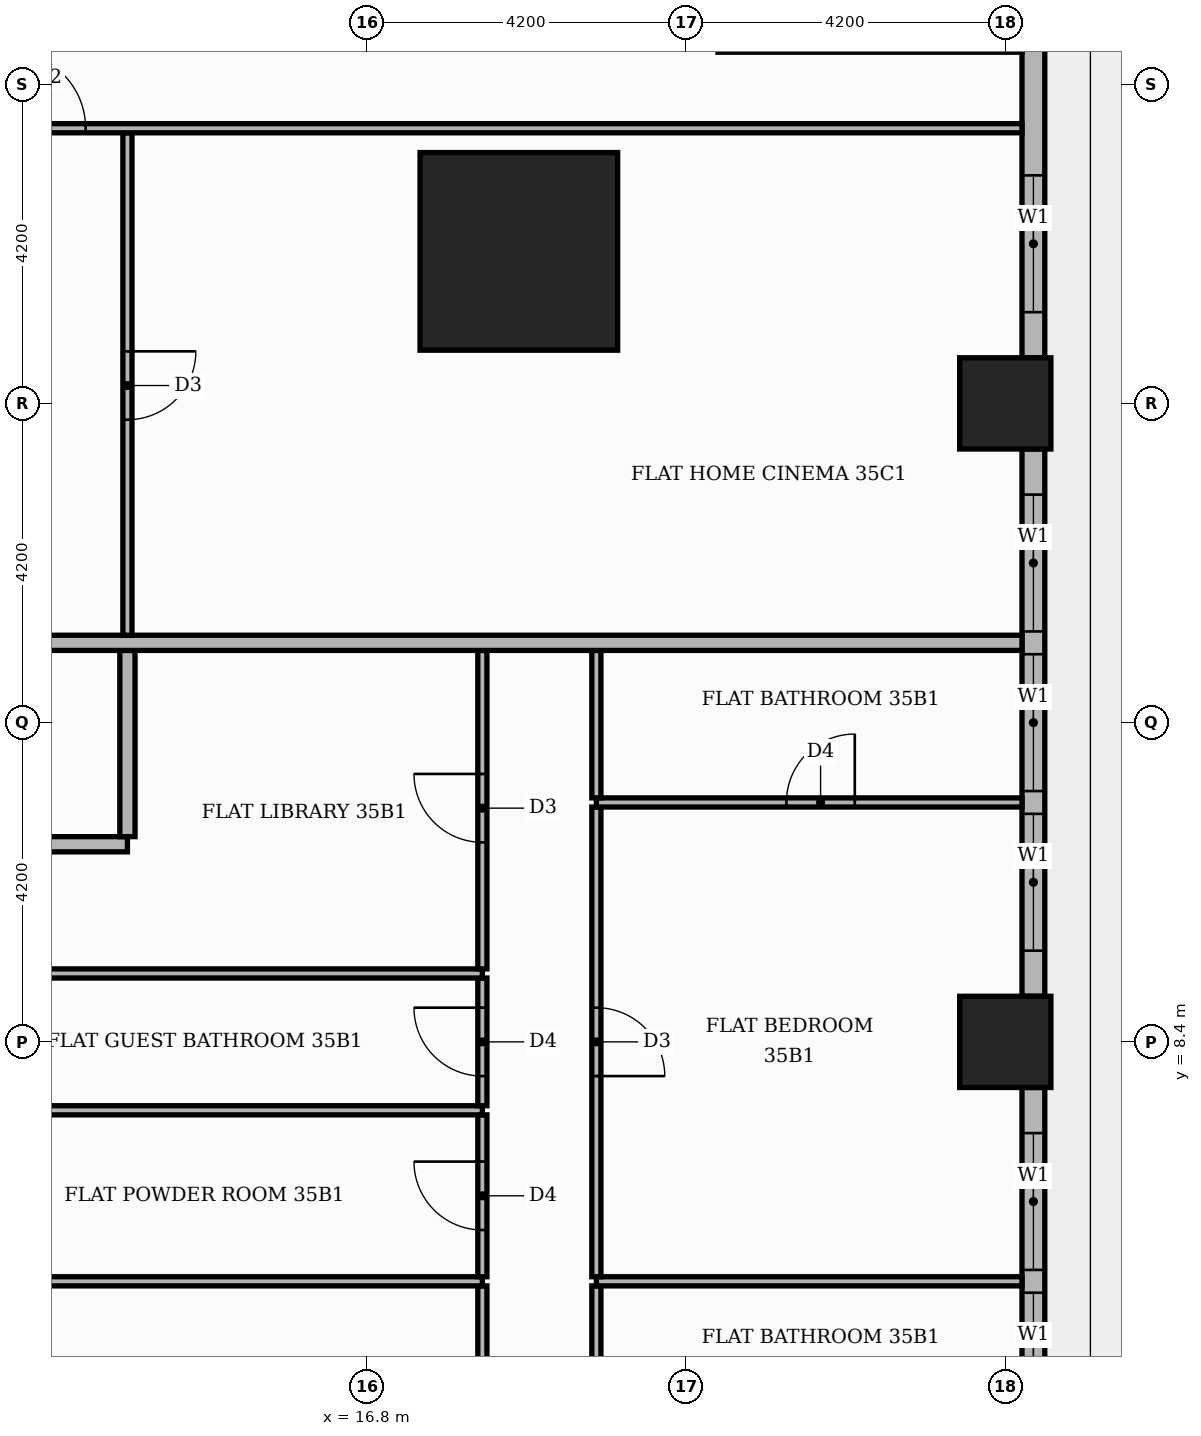
"""IFC4 building model, lengths in metres.
Left out: names, types, materials, properties, quantities, classifications, styles, units other than length and angle.
Written with IfcOpenShell. Run it as: python <this file> out.ifc"""

import sys

from ifc_helpers import new_model, si_unit, direction, frame, frame_2d, origin, origin_2d, place, context, subcontext, project, spatial, rectangle, extrude, element, fill, save


model = new_model("IFC4")
c1 = context("Model", 3, precision=1e-05, world=origin(), true_north=direction((0.0, 1.0)))
c2 = subcontext(c1, "Body", "Model", "MODEL_VIEW")
j1 = project(units=[si_unit("LENGTHUNIT", "METRE"), si_unit("PLANEANGLEUNIT", "RADIAN")], contexts=[c1])
p1 = place(None, origin())
s1 = spatial("IfcSite", under=j1, at=p1, CompositionType="ELEMENT")
p2 = place(p1, origin())
s2 = spatial("IfcBuilding", under=s1, at=p2, CompositionType="ELEMENT")
p3 = place(p2, frame((0.0, 0.0, 149.4)))
s3 = spatial("IfcBuildingStorey", under=s2, at=p3, CompositionType="ELEMENT", Elevation=149.4)
p4 = place(p3, frame((18.8, 18.8, 0.0), z_axis=(0.0, 0.0, 1.0), x_axis=(1.0, 0.0, 0.0)))
e1 = element("IfcColumn", 1, at=p4, inside=s3, PredefinedType="COLUMN", context=c2, shape_type="SweptSolid", body=[
    extrude(rectangle(XDim=2.6, YDim=2.6, at=origin_2d()), origin(), (0.0, 0.0, 1.0), 3.9),
])
for number, where, z_axis, x_axis in (
    (2, (25.2, 8.4, 0.0), (0.0, 0.0, 1.0), (1.0, 0.0, 0.0)),
    (3, (25.2, 16.8, 0.0), (0.0, 0.0, 1.0), (1.0, 0.0, 0.0)),
):
    element("IfcColumn", number, at=place(p3, frame(where, z_axis=z_axis, x_axis=x_axis)), inside=s3, PredefinedType="COLUMN", context=c2, shape_type="SweptSolid", body=[
        extrude(rectangle(XDim=1.2, YDim=1.2, at=origin_2d()), origin(), (0.0, 0.0, 1.0), 3.9),
    ])
p5 = place(p3, frame((25.57, 0.6, 0.0), z_axis=(0.0, 0.0, 1.0), x_axis=(0.0, 1.0, 0.0)))
e4 = element("IfcWall", 4, at=p5, inside=s3, PredefinedType="STANDARD", context=c2, shape_type="SweptSolid", body=[
    extrude(rectangle(XDim=7.2, YDim=0.3, at=frame_2d((3.6, 0.0))), origin(), (0.0, 0.0, 1.0), 3.48),
])
p6 = place(p5, frame((0.6, 0.0, 0.9)))
e5 = element("IfcOpeningElement", 5, at=p6, cuts=e4, PredefinedType="OPENING", context=c2, shape_type="SweptSolid", body=[
    extrude(rectangle(XDim=1.8, YDim=2.1, at=frame_2d((0.9, 1.05))), frame((0.0, 0.16, 0.0), z_axis=(0.0, -1.0, 0.0), x_axis=(1.0, 0.0, 0.0)), (0.0, 0.0, 1.0), 0.32),
])
p7 = place(p5, frame((2.7, 0.0, 0.9)))
e6 = element("IfcOpeningElement", 6, at=p7, cuts=e4, PredefinedType="OPENING", context=c2, shape_type="SweptSolid", body=[
    extrude(rectangle(XDim=1.8, YDim=2.1, at=frame_2d((0.9, 1.05))), frame((0.0, 0.16, 0.0), z_axis=(0.0, -1.0, 0.0), x_axis=(1.0, 0.0, 0.0)), (0.0, 0.0, 1.0), 0.32),
])
p8 = place(p5, frame((4.8, 0.0, 0.9)))
e7 = element("IfcOpeningElement", 7, at=p8, cuts=e4, PredefinedType="OPENING", context=c2, shape_type="SweptSolid", body=[
    extrude(rectangle(XDim=1.8, YDim=2.1, at=frame_2d((0.9, 1.05))), frame((0.0, 0.16, 0.0), z_axis=(0.0, -1.0, 0.0), x_axis=(1.0, 0.0, 0.0)), (0.0, 0.0, 1.0), 0.32),
])
p9 = place(p3, frame((25.57, 9.0, 0.0), z_axis=(0.0, 0.0, 1.0), x_axis=(0.0, 1.0, 0.0)))
e8 = element("IfcWall", 8, at=p9, inside=s3, PredefinedType="STANDARD", context=c2, shape_type="SweptSolid", body=[
    extrude(rectangle(XDim=7.2, YDim=0.3, at=frame_2d((3.6, 0.0))), origin(), (0.0, 0.0, 1.0), 3.48),
])
p10 = place(p9, frame((0.6, 0.0, 0.9)))
e9 = element("IfcOpeningElement", 9, at=p10, cuts=e8, PredefinedType="OPENING", context=c2, shape_type="SweptSolid", body=[
    extrude(rectangle(XDim=1.8, YDim=2.1, at=frame_2d((0.9, 1.05))), frame((0.0, 0.16, 0.0), z_axis=(0.0, -1.0, 0.0), x_axis=(1.0, 0.0, 0.0)), (0.0, 0.0, 1.0), 0.32),
])
p11 = place(p9, frame((2.7, 0.0, 0.9)))
e10 = element("IfcOpeningElement", 10, at=p11, cuts=e8, PredefinedType="OPENING", context=c2, shape_type="SweptSolid", body=[
    extrude(rectangle(XDim=1.8, YDim=2.1, at=frame_2d((0.9, 1.05))), frame((0.0, 0.16, 0.0), z_axis=(0.0, -1.0, 0.0), x_axis=(1.0, 0.0, 0.0)), (0.0, 0.0, 1.0), 0.32),
])
p12 = place(p9, frame((4.8, 0.0, 0.9)))
e11 = element("IfcOpeningElement", 11, at=p12, cuts=e8, PredefinedType="OPENING", context=c2, shape_type="SweptSolid", body=[
    extrude(rectangle(XDim=1.8, YDim=2.1, at=frame_2d((0.9, 1.05))), frame((0.0, 0.16, 0.0), z_axis=(0.0, -1.0, 0.0), x_axis=(1.0, 0.0, 0.0)), (0.0, 0.0, 1.0), 0.32),
])
p13 = place(p3, frame((25.57, 17.4, 0.0), z_axis=(0.0, 0.0, 1.0), x_axis=(0.0, 1.0, 0.0)))
e12 = element("IfcWall", 12, at=p13, inside=s3, PredefinedType="STANDARD", context=c2, shape_type="SweptSolid", body=[
    extrude(rectangle(XDim=4.32, YDim=0.3, at=frame_2d((2.16, 0.0))), origin(), (0.0, 0.0, 1.0), 3.48),
])
p14 = place(p13, frame((0.6, 0.0, 0.9)))
e13 = element("IfcOpeningElement", 13, at=p14, cuts=e12, PredefinedType="OPENING", context=c2, shape_type="SweptSolid", body=[
    extrude(rectangle(XDim=1.8, YDim=2.1, at=frame_2d((0.9, 1.05))), frame((0.0, 0.16, 0.0), z_axis=(0.0, -1.0, 0.0), x_axis=(1.0, 0.0, 0.0)), (0.0, 0.0, 1.0), 0.32),
])
p15 = place(p3, frame((18.32, 1.11, 0.0), z_axis=(0.0, 0.0, 1.0), x_axis=(0.0, 1.0, 0.0)))
e14 = element("IfcWall", 14, at=p15, inside=s3, PredefinedType="PARTITIONING", context=c2, shape_type="SweptSolid", body=[
    extrude(rectangle(XDim=4.08, YDim=0.12, at=frame_2d((2.04, 0.0))), origin(), (0.0, 0.0, 1.0), 3.48),
])
p16 = place(p15, frame((1.59, 0.0, 0.0)))
e15 = element("IfcOpeningElement", 15, at=p16, cuts=e14, PredefinedType="OPENING", context=c2, shape_type="SweptSolid", body=[
    extrude(rectangle(XDim=0.9, YDim=2.1, at=frame_2d((0.45, 1.05))), frame((0.0, 0.07, 0.0), z_axis=(0.0, -1.0, 0.0), x_axis=(1.0, 0.0, 0.0)), (0.0, 0.0, 1.0), 0.14),
])
p17 = place(p3, frame((19.82, 3.21, 0.0), z_axis=(0.0, 0.0, 1.0), x_axis=(0.0, 1.0, 0.0)))
e16 = element("IfcWall", 16, at=p17, inside=s3, PredefinedType="PARTITIONING", context=c2, shape_type="SweptSolid", body=[
    extrude(rectangle(XDim=1.98, YDim=0.12, at=frame_2d((0.99, 0.0))), origin(), (0.0, 0.0, 1.0), 3.48),
])
p18 = place(p3, frame((11.0, 5.25, 0.0), z_axis=(0.0, 0.0, 1.0), x_axis=(1.0, 0.0, 0.0)))
e17 = element("IfcWall", 17, at=p18, inside=s3, PredefinedType="PARTITIONING", context=c2, shape_type="SweptSolid", body=[
    extrude(rectangle(XDim=7.32, YDim=0.12, at=frame_2d((3.66, 0.0))), origin(), (0.0, 0.0, 1.0), 3.48),
])
p19 = place(p3, frame((19.82, 5.25, 0.0), z_axis=(0.0, 0.0, 1.0), x_axis=(1.0, 0.0, 0.0)))
e18 = element("IfcWall", 18, at=p19, inside=s3, PredefinedType="PARTITIONING", context=c2, shape_type="SweptSolid", body=[
    extrude(rectangle(XDim=5.6, YDim=0.12, at=frame_2d((2.8, 0.0))), origin(), (0.0, 0.0, 1.0), 3.48),
])
p20 = place(p3, frame((18.32, 5.31, 0.0), z_axis=(0.0, 0.0, 1.0), x_axis=(0.0, 1.0, 0.0)))
e19 = element("IfcWall", 19, at=p20, inside=s3, PredefinedType="PARTITIONING", context=c2, shape_type="SweptSolid", body=[
    extrude(rectangle(XDim=2.13, YDim=0.12, at=frame_2d((1.065, 0.0))), origin(), (0.0, 0.0, 1.0), 3.48),
])
p21 = place(p20, frame((0.615, 0.0, 0.0)))
e20 = element("IfcOpeningElement", 20, at=p21, cuts=e19, PredefinedType="OPENING", context=c2, shape_type="SweptSolid", body=[
    extrude(rectangle(XDim=0.9, YDim=2.1, at=frame_2d((0.45, 1.05))), frame((0.0, 0.07, 0.0), z_axis=(0.0, -1.0, 0.0), x_axis=(1.0, 0.0, 0.0)), (0.0, 0.0, 1.0), 0.14),
])
p22 = place(p3, frame((19.82, 5.31, 0.0), z_axis=(0.0, 0.0, 1.0), x_axis=(0.0, 1.0, 0.0)))
e21 = element("IfcWall", 21, at=p22, inside=s3, PredefinedType="PARTITIONING", context=c2, shape_type="SweptSolid", body=[
    extrude(rectangle(XDim=6.18, YDim=0.12, at=frame_2d((3.09, 0.0))), origin(), (0.0, 0.0, 1.0), 3.48),
])
p23 = place(p22, frame((2.64, 0.0, 0.0)))
e22 = element("IfcOpeningElement", 22, at=p23, cuts=e21, PredefinedType="OPENING", context=c2, shape_type="SweptSolid", body=[
    extrude(rectangle(XDim=0.9, YDim=2.1, at=frame_2d((0.45, 1.05))), frame((0.0, 0.07, 0.0), z_axis=(0.0, -1.0, 0.0), x_axis=(1.0, 0.0, 0.0)), (0.0, 0.0, 1.0), 0.14),
])
p24 = place(p3, frame((11.0, 7.5, 0.0), z_axis=(0.0, 0.0, 1.0), x_axis=(1.0, 0.0, 0.0)))
e23 = element("IfcWall", 23, at=p24, inside=s3, PredefinedType="PARTITIONING", context=c2, shape_type="SweptSolid", body=[
    extrude(rectangle(XDim=7.32, YDim=0.12, at=frame_2d((3.66, 0.0))), origin(), (0.0, 0.0, 1.0), 3.48),
])
p25 = place(p3, frame((18.32, 7.56, 0.0), z_axis=(0.0, 0.0, 1.0), x_axis=(0.0, 1.0, 0.0)))
e24 = element("IfcWall", 24, at=p25, inside=s3, PredefinedType="PARTITIONING", context=c2, shape_type="SweptSolid", body=[
    extrude(rectangle(XDim=1.68, YDim=0.12, at=frame_2d((0.84, 0.0))), origin(), (0.0, 0.0, 1.0), 3.48),
])
p26 = place(p25, frame((0.39, 0.0, 0.0)))
e25 = element("IfcOpeningElement", 25, at=p26, cuts=e24, PredefinedType="OPENING", context=c2, shape_type="SweptSolid", body=[
    extrude(rectangle(XDim=0.9, YDim=2.1, at=frame_2d((0.45, 1.05))), frame((0.0, 0.07, 0.0), z_axis=(0.0, -1.0, 0.0), x_axis=(1.0, 0.0, 0.0)), (0.0, 0.0, 1.0), 0.14),
])
p27 = place(p3, frame((11.0, 9.3, 0.0), z_axis=(0.0, 0.0, 1.0), x_axis=(1.0, 0.0, 0.0)))
e26 = element("IfcWall", 26, at=p27, inside=s3, PredefinedType="PARTITIONING", context=c2, shape_type="SweptSolid", body=[
    extrude(rectangle(XDim=7.32, YDim=0.12, at=frame_2d((3.66, 0.0))), origin(), (0.0, 0.0, 1.0), 3.48),
])
p28 = place(p3, frame((18.32, 9.36, 0.0), z_axis=(0.0, 0.0, 1.0), x_axis=(0.0, 1.0, 0.0)))
e27 = element("IfcWall", 27, at=p28, inside=s3, PredefinedType="PARTITIONING", context=c2, shape_type="SweptSolid", body=[
    extrude(rectangle(XDim=4.19, YDim=0.12, at=frame_2d((2.095, 0.0))), origin(), (0.0, 0.0, 1.0), 3.48),
])
p29 = place(p28, frame((1.665, 0.0, 0.0)))
e28 = element("IfcOpeningElement", 28, at=p29, cuts=e27, PredefinedType="OPENING", context=c2, shape_type="SweptSolid", body=[
    extrude(rectangle(XDim=0.9, YDim=2.1, at=frame_2d((0.45, 1.05))), frame((0.0, 0.07, 0.0), z_axis=(0.0, -1.0, 0.0), x_axis=(1.0, 0.0, 0.0)), (0.0, 0.0, 1.0), 0.14),
])
p30 = place(p3, frame((11.0, 11.0, 0.0), z_axis=(0.0, 0.0, 1.0), x_axis=(1.0, 0.0, 0.0)))
e29 = element("IfcWall", 29, at=p30, inside=s3, PredefinedType="PARTITIONING", context=c2, shape_type="SweptSolid", body=[
    extrude(rectangle(XDim=2.65, YDim=0.2, at=frame_2d((1.325, 0.0))), origin(), (0.0, 0.0, 1.0), 3.48),
])
p31 = place(p3, frame((13.65, 11.1, 0.0), z_axis=(0.0, 0.0, 1.0), x_axis=(0.0, 1.0, 0.0)))
e30 = element("IfcWall", 30, at=p31, inside=s3, PredefinedType="PARTITIONING", context=c2, shape_type="SweptSolid", body=[
    extrude(rectangle(XDim=2.45, YDim=0.2, at=frame_2d((1.225, 0.0))), origin(), (0.0, 0.0, 1.0), 3.48),
])
p32 = place(p3, frame((19.82, 11.55, 0.0), z_axis=(0.0, 0.0, 1.0), x_axis=(1.0, 0.0, 0.0)))
e31 = element("IfcWall", 31, at=p32, inside=s3, PredefinedType="PARTITIONING", context=c2, shape_type="SweptSolid", body=[
    extrude(rectangle(XDim=5.6, YDim=0.12, at=frame_2d((2.8, 0.0))), origin(), (0.0, 0.0, 1.0), 3.48),
])
p33 = place(p32, frame((2.5, 0.0, 0.0)))
e32 = element("IfcOpeningElement", 32, at=p33, cuts=e31, PredefinedType="OPENING", context=c2, shape_type="SweptSolid", body=[
    extrude(rectangle(XDim=0.9, YDim=2.1, at=frame_2d((0.45, 1.05))), frame((0.0, 0.07, 0.0), z_axis=(0.0, -1.0, 0.0), x_axis=(1.0, 0.0, 0.0)), (0.0, 0.0, 1.0), 0.14),
])
p34 = place(p3, frame((19.82, 11.61, 0.0), z_axis=(0.0, 0.0, 1.0), x_axis=(0.0, 1.0, 0.0)))
e33 = element("IfcWall", 33, at=p34, inside=s3, PredefinedType="PARTITIONING", context=c2, shape_type="SweptSolid", body=[
    extrude(rectangle(XDim=1.94, YDim=0.12, at=frame_2d((0.97, 0.0))), origin(), (0.0, 0.0, 1.0), 3.48),
])
p35 = place(p3, frame((-13.65, 13.65, 0.0), z_axis=(0.0, 0.0, 1.0), x_axis=(1.0, 0.0, 0.0)))
e34 = element("IfcWall", 34, at=p35, inside=s3, PredefinedType="PARTITIONING", context=c2, shape_type="SweptSolid", body=[
    extrude(rectangle(XDim=39.07, YDim=0.2, at=frame_2d((19.535, 0.0))), origin(), (0.0, 0.0, 1.0), 3.48),
])
p36 = place(p35, frame((23.6, 0.0, 0.0)))
e35 = element("IfcOpeningElement", 35, at=p36, cuts=e34, PredefinedType="OPENING", context=c2, shape_type="SweptSolid", body=[
    extrude(rectangle(XDim=1.1, YDim=2.4, at=frame_2d((0.55, 1.2))), frame((0.0, 0.11, 0.0), z_axis=(0.0, -1.0, 0.0), x_axis=(1.0, 0.0, 0.0)), (0.0, 0.0, 1.0), 0.22),
])
p37 = place(p3, frame((13.65, 13.75, 0.0), z_axis=(0.0, 0.0, 1.0), x_axis=(0.0, 1.0, 0.0)))
e36 = element("IfcWall", 36, at=p37, inside=s3, PredefinedType="PARTITIONING", context=c2, shape_type="SweptSolid", body=[
    extrude(rectangle(XDim=6.61, YDim=0.12, at=frame_2d((3.305, 0.0))), origin(), (0.0, 0.0, 1.0), 3.48),
])
p38 = place(p37, frame((2.835, 0.0, 0.0)))
e37 = element("IfcOpeningElement", 37, at=p38, cuts=e36, PredefinedType="OPENING", context=c2, shape_type="SweptSolid", body=[
    extrude(rectangle(XDim=0.9, YDim=2.1, at=frame_2d((0.45, 1.05))), frame((0.0, 0.07, 0.0), z_axis=(0.0, -1.0, 0.0), x_axis=(1.0, 0.0, 0.0)), (0.0, 0.0, 1.0), 0.14),
])
p39 = place(p3, frame((7.35, 20.42, 0.0), z_axis=(0.0, 0.0, 1.0), x_axis=(1.0, 0.0, 0.0)))
e38 = element("IfcWall", 38, at=p39, inside=s3, PredefinedType="PARTITIONING", context=c2, shape_type="SweptSolid", body=[
    extrude(rectangle(XDim=18.07, YDim=0.12, at=frame_2d((9.035, 0.0))), origin(), (0.0, 0.0, 1.0), 3.48),
])
p40 = place(p39, frame((4.75, 0.0, 0.0)))
e39 = element("IfcOpeningElement", 39, at=p40, cuts=e38, PredefinedType="OPENING", context=c2, shape_type="SweptSolid", body=[
    extrude(rectangle(XDim=1.0, YDim=2.1, at=frame_2d((0.5, 1.05))), frame((0.0, 0.07, 0.0), z_axis=(0.0, -1.0, 0.0), x_axis=(1.0, 0.0, 0.0)), (0.0, 0.0, 1.0), 0.14),
])
p41 = place(p39, frame((1.6, 0.0, 0.0)))
e40 = element("IfcOpeningElement", 40, at=p41, cuts=e38, PredefinedType="OPENING", context=c2, shape_type="SweptSolid", body=[
    extrude(rectangle(XDim=1.0, YDim=2.1, at=frame_2d((0.5, 1.05))), frame((0.0, 0.07, 0.0), z_axis=(0.0, -1.0, 0.0), x_axis=(1.0, 0.0, 0.0)), (0.0, 0.0, 1.0), 0.14),
])
p42 = place(p7, origin())
e41 = element("IfcWindow", 41, at=p42, inside=s3, PartitioningType="SINGLE_PANEL", PredefinedType="WINDOW", context=c2, shape_type="SweptSolid", body=[
    extrude(rectangle(XDim=1.8, YDim=2.1, at=frame_2d((0.9, 1.05))), frame((0.0, 0.03, 0.0), z_axis=(0.0, -1.0, 0.0), x_axis=(1.0, 0.0, 0.0)), (0.0, 0.0, 1.0), 0.06),
])
fill(e6, e41)
p43 = place(p8, origin())
e42 = element("IfcWindow", 42, at=p43, inside=s3, PartitioningType="SINGLE_PANEL", PredefinedType="WINDOW", context=c2, shape_type="SweptSolid", body=[
    extrude(rectangle(XDim=1.8, YDim=2.1, at=frame_2d((0.9, 1.05))), frame((0.0, 0.03, 0.0), z_axis=(0.0, -1.0, 0.0), x_axis=(1.0, 0.0, 0.0)), (0.0, 0.0, 1.0), 0.06),
])
fill(e7, e42)
p44 = place(p10, origin())
e43 = element("IfcWindow", 43, at=p44, inside=s3, PartitioningType="SINGLE_PANEL", PredefinedType="WINDOW", context=c2, shape_type="SweptSolid", body=[
    extrude(rectangle(XDim=1.8, YDim=2.1, at=frame_2d((0.9, 1.05))), frame((0.0, 0.03, 0.0), z_axis=(0.0, -1.0, 0.0), x_axis=(1.0, 0.0, 0.0)), (0.0, 0.0, 1.0), 0.06),
])
fill(e9, e43)
p45 = place(p11, origin())
e44 = element("IfcWindow", 44, at=p45, inside=s3, PartitioningType="SINGLE_PANEL", PredefinedType="WINDOW", context=c2, shape_type="SweptSolid", body=[
    extrude(rectangle(XDim=1.8, YDim=2.1, at=frame_2d((0.9, 1.05))), frame((0.0, 0.03, 0.0), z_axis=(0.0, -1.0, 0.0), x_axis=(1.0, 0.0, 0.0)), (0.0, 0.0, 1.0), 0.06),
])
fill(e10, e44)
p46 = place(p12, origin())
e45 = element("IfcWindow", 45, at=p46, inside=s3, PartitioningType="SINGLE_PANEL", PredefinedType="WINDOW", context=c2, shape_type="SweptSolid", body=[
    extrude(rectangle(XDim=1.8, YDim=2.1, at=frame_2d((0.9, 1.05))), frame((0.0, 0.03, 0.0), z_axis=(0.0, -1.0, 0.0), x_axis=(1.0, 0.0, 0.0)), (0.0, 0.0, 1.0), 0.06),
])
fill(e11, e45)
p47 = place(p14, origin())
e46 = element("IfcWindow", 46, at=p47, inside=s3, PartitioningType="SINGLE_PANEL", PredefinedType="WINDOW", context=c2, shape_type="SweptSolid", body=[
    extrude(rectangle(XDim=1.8, YDim=2.1, at=frame_2d((0.9, 1.05))), frame((0.0, 0.03, 0.0), z_axis=(0.0, -1.0, 0.0), x_axis=(1.0, 0.0, 0.0)), (0.0, 0.0, 1.0), 0.06),
])
fill(e13, e46)
p48 = place(p21, origin())
e47 = element("IfcDoor", 47, at=p48, inside=s3, OperationType="SINGLE_SWING_RIGHT", PredefinedType="DOOR", context=c2, shape_type="SweptSolid", body=[
    extrude(rectangle(XDim=0.9, YDim=2.1, at=frame_2d((0.45, 1.05))), frame((0.0, 0.025, 0.0), z_axis=(0.0, -1.0, 0.0), x_axis=(1.0, 0.0, 0.0)), (0.0, 0.0, 1.0), 0.05),
])
fill(e20, e47)
p49 = place(p26, origin())
e48 = element("IfcDoor", 48, at=p49, inside=s3, OperationType="SINGLE_SWING_RIGHT", PredefinedType="DOOR", context=c2, shape_type="SweptSolid", body=[
    extrude(rectangle(XDim=0.9, YDim=2.1, at=frame_2d((0.45, 1.05))), frame((0.0, 0.025, 0.0), z_axis=(0.0, -1.0, 0.0), x_axis=(1.0, 0.0, 0.0)), (0.0, 0.0, 1.0), 0.05),
])
fill(e25, e48)
p50 = place(p29, origin())
e49 = element("IfcDoor", 49, at=p50, inside=s3, OperationType="SINGLE_SWING_RIGHT", PredefinedType="DOOR", context=c2, shape_type="SweptSolid", body=[
    extrude(rectangle(XDim=0.9, YDim=2.1, at=frame_2d((0.45, 1.05))), frame((0.0, 0.025, 0.0), z_axis=(0.0, -1.0, 0.0), x_axis=(1.0, 0.0, 0.0)), (0.0, 0.0, 1.0), 0.05),
])
fill(e28, e49)
p51 = place(p23, frame((0.9, 0.0, 0.0), z_axis=(0.0, 0.0, 1.0), x_axis=(-1.0, 0.0, 0.0)))
e50 = element("IfcDoor", 50, at=p51, inside=s3, OperationType="SINGLE_SWING_LEFT", PredefinedType="DOOR", context=c2, shape_type="SweptSolid", body=[
    extrude(rectangle(XDim=0.9, YDim=2.1, at=frame_2d((0.45, 1.05))), frame((0.0, 0.025, 0.0), z_axis=(0.0, -1.0, 0.0), x_axis=(1.0, 0.0, 0.0)), (0.0, 0.0, 1.0), 0.05),
])
fill(e22, e50)
p52 = place(p33, origin())
e51 = element("IfcDoor", 51, at=p52, inside=s3, OperationType="SINGLE_SWING_RIGHT", PredefinedType="DOOR", context=c2, shape_type="SweptSolid", body=[
    extrude(rectangle(XDim=0.9, YDim=2.1, at=frame_2d((0.45, 1.05))), frame((0.0, 0.025, 0.0), z_axis=(0.0, -1.0, 0.0), x_axis=(1.0, 0.0, 0.0)), (0.0, 0.0, 1.0), 0.05),
])
fill(e32, e51)
p53 = place(p38, frame((0.9, 0.0, 0.0), z_axis=(0.0, 0.0, 1.0), x_axis=(-1.0, 0.0, 0.0)))
e52 = element("IfcDoor", 52, at=p53, inside=s3, OperationType="SINGLE_SWING_RIGHT", PredefinedType="DOOR", context=c2, shape_type="SweptSolid", body=[
    extrude(rectangle(XDim=0.9, YDim=2.1, at=frame_2d((0.45, 1.05))), frame((0.0, 0.025, 0.0), z_axis=(0.0, -1.0, 0.0), x_axis=(1.0, 0.0, 0.0)), (0.0, 0.0, 1.0), 0.05),
])
fill(e37, e52)
p54 = place(p40, origin())
e53 = element("IfcDoor", 53, at=p54, inside=s3, OperationType="SINGLE_SWING_LEFT", PredefinedType="DOOR", context=c2, shape_type="SweptSolid", body=[
    extrude(rectangle(XDim=1.0, YDim=2.1, at=frame_2d((0.5, 1.05))), frame((0.0, 0.025, 0.0), z_axis=(0.0, -1.0, 0.0), x_axis=(1.0, 0.0, 0.0)), (0.0, 0.0, 1.0), 0.05),
])
fill(e39, e53)
save(model, sys.argv[1])
